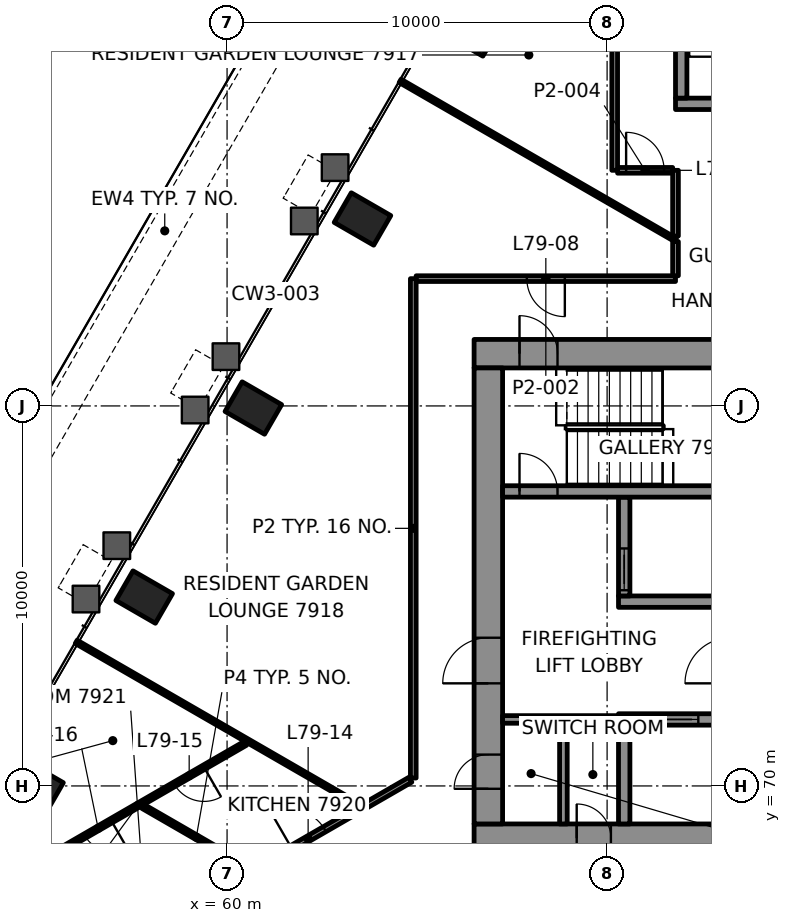
"""IFC4 building model, lengths in metres.
Left out: names, types, materials, properties, quantities, classifications, styles, units other than length and angle.
Written with IfcOpenShell. Run it as: python <this file> out.ifc"""

import sys

from ifc_helpers import new_model, si_unit, direction, frame, frame_2d, origin, origin_2d, place, context, subcontext, project, spatial, rectangle, hollow_rectangle, extrude, element, fill, save


model = new_model("IFC4")
c1 = context("Model", 3, precision=1e-05, world=origin(), true_north=direction((0.0, 1.0)))
c2 = subcontext(c1, "Body", "Model", "MODEL_VIEW")
j1 = project(units=[si_unit("LENGTHUNIT", "METRE"), si_unit("PLANEANGLEUNIT", "RADIAN")], contexts=[c1])
p1 = place(None, origin())
s1 = spatial("IfcSite", under=j1, at=p1, CompositionType="ELEMENT")
p2 = place(p1, origin())
s2 = spatial("IfcBuilding", under=s1, at=p2, CompositionType="ELEMENT")
p3 = place(p2, frame((0.0, 0.0, 323.1)))
s3 = spatial("IfcBuildingStorey", under=s2, at=p3, CompositionType="ELEMENT", Elevation=323.1)
for number, where, z_axis, x_axis in (
    (1, (66.435, 89.894, -0.0), (0.0, 0.0, 1.0), (-0.5, -0.866, 0.0)),
    (2, (63.563, 84.919, -0.0), (0.0, 0.0, 1.0), (-0.5, -0.866, 0.0)),
    (3, (60.691, 79.945, -0.0), (0.0, 0.0, 1.0), (-0.5, -0.866, 0.0)),
    (4, (57.819, 74.97, -0.0), (0.0, 0.0, 1.0), (-0.5, -0.866, 0.0)),
    (5, (54.948, 69.996, -0.0), (0.0, 0.0, 1.0), (-0.5, -0.866, 0.0)),
):
    element("IfcColumn", number, at=place(p3, frame(where, z_axis=z_axis, x_axis=x_axis)), inside=s3, PredefinedType="COLUMN", context=c2, shape_type="SweptSolid", body=[
        extrude(hollow_rectangle(XDim=0.9, YDim=1.2, WallThickness=0.06, at=origin_2d()), origin(), (0.0, 0.0, 1.0), 3.5),
    ])
p4 = place(p3, frame((66.5, 68.625, 0.0), z_axis=(0.0, 0.0, 1.0), x_axis=(1.0, 0.0, 0.0)))
e6 = element("IfcWall", 6, at=p4, inside=s3, PredefinedType="SHEAR", context=c2, shape_type="SweptSolid", body=[
    extrude(rectangle(XDim=17.0, YDim=0.75, at=frame_2d((8.5, 0.0))), origin(), (0.0, 0.0, 1.0), 3.2),
])
p5 = place(p4, frame((2.7, 0.0, 0.0)))
e7 = element("IfcOpeningElement", 7, at=p5, cuts=e6, PredefinedType="OPENING", context=c2, shape_type="SweptSolid", body=[
    extrude(rectangle(XDim=0.9, YDim=2.1, at=frame_2d((0.45, 1.05))), frame((0.0, 0.385, 0.0), z_axis=(0.0, -1.0, 0.0), x_axis=(1.0, 0.0, 0.0)), (0.0, 0.0, 1.0), 0.77),
])
p6 = place(p3, frame((66.5, 81.375, 0.0), z_axis=(0.0, 0.0, 1.0), x_axis=(1.0, 0.0, 0.0)))
e8 = element("IfcWall", 8, at=p6, inside=s3, PredefinedType="SHEAR", context=c2, shape_type="SweptSolid", body=[
    extrude(rectangle(XDim=17.0, YDim=0.75, at=frame_2d((8.5, 0.0))), origin(), (0.0, 0.0, 1.0), 3.2),
])
p7 = place(p6, frame((1.195, 0.0, 0.0)))
e9 = element("IfcOpeningElement", 9, at=p7, cuts=e8, PredefinedType="OPENING", context=c2, shape_type="SweptSolid", body=[
    extrude(rectangle(XDim=1.0, YDim=2.1, at=frame_2d((0.5, 1.05))), frame((0.0, 0.385, 0.0), z_axis=(0.0, -1.0, 0.0), x_axis=(1.0, 0.0, 0.0)), (0.0, 0.0, 1.0), 0.77),
])
p8 = place(p6, frame((15.005, 0.0, 0.0)))
e10 = element("IfcOpeningElement", 10, at=p8, cuts=e8, PredefinedType="OPENING", context=c2, shape_type="SweptSolid", body=[
    extrude(rectangle(XDim=1.0, YDim=2.1, at=frame_2d((0.5, 1.05))), frame((0.0, 0.385, 0.0), z_axis=(0.0, -1.0, 0.0), x_axis=(1.0, 0.0, 0.0)), (0.0, 0.0, 1.0), 0.77),
])
p9 = place(p6, frame((8.15, 0.0, 0.0)))
e11 = element("IfcOpeningElement", 11, at=p9, cuts=e8, PredefinedType="OPENING", context=c2, shape_type="SweptSolid", body=[
    extrude(rectangle(XDim=0.9, YDim=2.1, at=frame_2d((0.45, 1.05))), frame((0.0, 0.385, 0.0), z_axis=(0.0, -1.0, 0.0), x_axis=(1.0, 0.0, 0.0)), (0.0, 0.0, 1.0), 0.77),
])
p10 = place(p3, frame((66.875, 69.0, 0.0), z_axis=(0.0, 0.0, 1.0), x_axis=(0.0, 1.0, 0.0)))
e12 = element("IfcWall", 12, at=p10, inside=s3, PredefinedType="SHEAR", context=c2, shape_type="SweptSolid", body=[
    extrude(rectangle(XDim=12.0, YDim=0.75, at=frame_2d((6.0, 0.0))), origin(), (0.0, 0.0, 1.0), 3.2),
])
p11 = place(p10, frame((3.7, 0.0, 0.0)))
e13 = element("IfcOpeningElement", 13, at=p11, cuts=e12, PredefinedType="OPENING", context=c2, shape_type="SweptSolid", body=[
    extrude(rectangle(XDim=1.2, YDim=2.1, at=frame_2d((0.6, 1.05))), frame((0.0, 0.385, 0.0), z_axis=(0.0, -1.0, 0.0), x_axis=(1.0, 0.0, 0.0)), (0.0, 0.0, 1.0), 0.77),
])
p12 = place(p10, frame((0.925, 0.0, 0.0)))
e14 = element("IfcOpeningElement", 14, at=p12, cuts=e12, PredefinedType="OPENING", context=c2, shape_type="SweptSolid", body=[
    extrude(rectangle(XDim=0.9, YDim=2.1, at=frame_2d((0.45, 1.05))), frame((0.0, 0.385, 0.0), z_axis=(0.0, -1.0, 0.0), x_axis=(1.0, 0.0, 0.0)), (0.0, 0.0, 1.0), 0.77),
])
p13 = place(p3, frame((70.3, 71.75, 0.0), z_axis=(0.0, 0.0, 1.0), x_axis=(1.0, 0.0, 0.0)))
e15 = element("IfcWall", 15, at=p13, inside=s3, PredefinedType="SHEAR", context=c2, shape_type="SweptSolid", body=[
    extrude(rectangle(XDim=11.5, YDim=0.3, at=frame_2d((5.75, 0.0))), origin(), (0.0, 0.0, 1.0), 3.2),
])
p14 = place(p13, frame((1.0, 0.0, 0.0)))
e16 = element("IfcOpeningElement", 16, at=p14, cuts=e15, PredefinedType="OPENING", context=c2, shape_type="SweptSolid", body=[
    extrude(rectangle(XDim=1.1, YDim=2.1, at=frame_2d((0.55, 1.05))), frame((0.0, 0.16, 0.0), z_axis=(0.0, -1.0, 0.0), x_axis=(1.0, 0.0, 0.0)), (0.0, 0.0, 1.0), 0.32),
])
p15 = place(p13, frame((3.8, 0.0, 0.0)))
e17 = element("IfcOpeningElement", 17, at=p15, cuts=e15, PredefinedType="OPENING", context=c2, shape_type="SweptSolid", body=[
    extrude(rectangle(XDim=1.1, YDim=2.1, at=frame_2d((0.55, 1.05))), frame((0.0, 0.16, 0.0), z_axis=(0.0, -1.0, 0.0), x_axis=(1.0, 0.0, 0.0)), (0.0, 0.0, 1.0), 0.32),
])
p16 = place(p13, frame((6.6, 0.0, 0.0)))
e18 = element("IfcOpeningElement", 18, at=p16, cuts=e15, PredefinedType="OPENING", context=c2, shape_type="SweptSolid", body=[
    extrude(rectangle(XDim=1.1, YDim=2.1, at=frame_2d((0.55, 1.05))), frame((0.0, 0.16, 0.0), z_axis=(0.0, -1.0, 0.0), x_axis=(1.0, 0.0, 0.0)), (0.0, 0.0, 1.0), 0.32),
])
p17 = place(p13, frame((9.4, 0.0, 0.0)))
e19 = element("IfcOpeningElement", 19, at=p17, cuts=e15, PredefinedType="OPENING", context=c2, shape_type="SweptSolid", body=[
    extrude(rectangle(XDim=1.1, YDim=2.1, at=frame_2d((0.55, 1.05))), frame((0.0, 0.16, 0.0), z_axis=(0.0, -1.0, 0.0), x_axis=(1.0, 0.0, 0.0)), (0.0, 0.0, 1.0), 0.32),
])
p18 = place(p3, frame((70.3, 74.85, 0.0), z_axis=(0.0, 0.0, 1.0), x_axis=(1.0, 0.0, 0.0)))
e20 = element("IfcWall", 20, at=p18, inside=s3, PredefinedType="SHEAR", context=c2, shape_type="SweptSolid", body=[
    extrude(rectangle(XDim=5.9, YDim=0.3, at=frame_2d((2.95, 0.0))), origin(), (0.0, 0.0, 1.0), 3.2),
])
p19 = place(p18, frame((3.8, 0.0, 0.0)))
e21 = element("IfcOpeningElement", 21, at=p19, cuts=e20, PredefinedType="OPENING", context=c2, shape_type="SweptSolid", body=[
    extrude(rectangle(XDim=1.1, YDim=2.1, at=frame_2d((0.55, 1.05))), frame((0.0, 0.16, 0.0), z_axis=(0.0, -1.0, 0.0), x_axis=(1.0, 0.0, 0.0)), (0.0, 0.0, 1.0), 0.32),
])
p20 = place(p3, frame((70.45, 69.0, 0.0), z_axis=(0.0, 0.0, 1.0), x_axis=(0.0, 1.0, 0.0)))
e22 = element("IfcWall", 22, at=p20, inside=s3, PredefinedType="SHEAR", context=c2, shape_type="SweptSolid", body=[
    extrude(rectangle(XDim=2.6, YDim=0.3, at=frame_2d((1.3, 0.0))), origin(), (0.0, 0.0, 1.0), 3.2),
])
p21 = place(p3, frame((70.45, 75.0, 0.0), z_axis=(0.0, 0.0, 1.0), x_axis=(0.0, 1.0, 0.0)))
e23 = element("IfcWall", 23, at=p21, inside=s3, PredefinedType="SHEAR", context=c2, shape_type="SweptSolid", body=[
    extrude(rectangle(XDim=2.6, YDim=0.3, at=frame_2d((1.3, 0.0))), origin(), (0.0, 0.0, 1.0), 3.2),
])
p22 = place(p21, frame((0.15, 0.0, 0.0)))
e24 = element("IfcOpeningElement", 24, at=p22, cuts=e23, PredefinedType="OPENING", context=c2, shape_type="SweptSolid", body=[
    extrude(rectangle(XDim=1.1, YDim=2.1, at=frame_2d((0.55, 1.05))), frame((0.0, 0.16, 0.0), z_axis=(0.0, -1.0, 0.0), x_axis=(1.0, 0.0, 0.0)), (0.0, 0.0, 1.0), 0.32),
])
p23 = place(p3, frame((67.25, 77.75, 0.0), z_axis=(0.0, 0.0, 1.0), x_axis=(1.0, 0.0, 0.0)))
e25 = element("IfcWall", 25, at=p23, inside=s3, PredefinedType="SHEAR", context=c2, shape_type="SweptSolid", body=[
    extrude(rectangle(XDim=15.5, YDim=0.3, at=frame_2d((7.75, 0.0))), origin(), (0.0, 0.0, 1.0), 3.2),
])
p24 = place(p23, frame((0.445, 0.0, 0.0)))
e26 = element("IfcOpeningElement", 26, at=p24, cuts=e25, PredefinedType="OPENING", context=c2, shape_type="SweptSolid", body=[
    extrude(rectangle(XDim=1.0, YDim=2.1, at=frame_2d((0.5, 1.05))), frame((0.0, 0.16, 0.0), z_axis=(0.0, -1.0, 0.0), x_axis=(1.0, 0.0, 0.0)), (0.0, 0.0, 1.0), 0.32),
])
p25 = place(p3, frame((71.8, 87.95, 0.0), z_axis=(0.0, 0.0, 1.0), x_axis=(1.0, 0.0, 0.0)))
e27 = element("IfcWall", 27, at=p25, inside=s3, PredefinedType="SHEAR", context=c2, shape_type="SweptSolid", body=[
    extrude(rectangle(XDim=6.4, YDim=0.3, at=frame_2d((3.2, 0.0))), origin(), (0.0, 0.0, 1.0), 3.2),
])
p26 = place(p25, frame((1.325, 0.0, 0.0)))
e28 = element("IfcOpeningElement", 28, at=p26, cuts=e27, PredefinedType="OPENING", context=c2, shape_type="SweptSolid", body=[
    extrude(rectangle(XDim=1.0, YDim=2.1, at=frame_2d((0.5, 1.05))), frame((0.0, 0.16, 0.0), z_axis=(0.0, -1.0, 0.0), x_axis=(1.0, 0.0, 0.0)), (0.0, 0.0, 1.0), 0.32),
])
p27 = place(p25, frame((4.125, 0.0, 0.0)))
e29 = element("IfcOpeningElement", 29, at=p27, cuts=e27, PredefinedType="OPENING", context=c2, shape_type="SweptSolid", body=[
    extrude(rectangle(XDim=1.2, YDim=2.1, at=frame_2d((0.6, 1.05))), frame((0.0, 0.16, 0.0), z_axis=(0.0, -1.0, 0.0), x_axis=(1.0, 0.0, 0.0)), (0.0, 0.0, 1.0), 0.32),
])
p28 = place(p3, frame((71.95, 88.1, 0.0), z_axis=(0.0, 0.0, 1.0), x_axis=(0.0, 1.0, 0.0)))
e30 = element("IfcWall", 30, at=p28, inside=s3, PredefinedType="SHEAR", context=c2, shape_type="SweptSolid", body=[
    extrude(rectangle(XDim=6.2, YDim=0.3, at=frame_2d((3.1, 0.0))), origin(), (0.0, 0.0, 1.0), 3.2),
])
p29 = place(p3, frame((71.8, 83.35, 0.0), z_axis=(0.0, 0.0, 1.0), x_axis=(-1.0, 0.0, 0.0)))
e31 = element("IfcWall", 31, at=p29, inside=s3, PredefinedType="PARTITIONING", context=c2, shape_type="SweptSolid", body=[
    extrude(rectangle(XDim=6.824, YDim=0.15, at=frame_2d((3.412, 0.0))), origin(), (0.0, 0.0, 1.0), 2.6),
])
p30 = place(p29, frame((2.912, 0.0, 0.0)))
e32 = element("IfcOpeningElement", 32, at=p30, cuts=e31, PredefinedType="OPENING", context=c2, shape_type="SweptSolid", body=[
    extrude(rectangle(XDim=1.0, YDim=2.1, at=frame_2d((0.5, 1.05))), frame((0.0, 0.085, 0.0), z_axis=(0.0, -1.0, 0.0), x_axis=(1.0, 0.0, 0.0)), (0.0, 0.0, 1.0), 0.17),
])
p31 = place(p3, frame((70.276, 86.2, 0.0), z_axis=(0.0, 0.0, 1.0), x_axis=(1.0, 0.0, 0.0)))
e33 = element("IfcWall", 33, at=p31, inside=s3, PredefinedType="PARTITIONING", context=c2, shape_type="SweptSolid", body=[
    extrude(rectangle(XDim=1.449, YDim=0.15, at=frame_2d((0.725, 0.0))), origin(), (0.0, 0.0, 1.0), 2.6),
])
p32 = place(p31, frame((0.225, 0.0, 0.0)))
e34 = element("IfcOpeningElement", 34, at=p32, cuts=e33, PredefinedType="OPENING", context=c2, shape_type="SweptSolid", body=[
    extrude(rectangle(XDim=1.0, YDim=2.1, at=frame_2d((0.5, 1.05))), frame((0.0, 0.085, 0.0), z_axis=(0.0, -1.0, 0.0), x_axis=(1.0, 0.0, 0.0)), (0.0, 0.0, 1.0), 0.17),
])
p33 = place(p3, frame((55.244, 64.634, 0.0), z_axis=(0.0, 0.0, 1.0), x_axis=(0.866029028053, 0.499993722531, 0.0)))
e35 = element("IfcWall", 35, at=p33, inside=s3, PredefinedType="PARTITIONING", context=c2, shape_type="SweptSolid", body=[
    extrude(rectangle(XDim=11.063, YDim=0.15, at=frame_2d((5.531, 0.0))), origin(), (0.0, 0.0, 1.0), 2.6),
])
p34 = place(p33, frame((7.454, 0.0, 0.0)))
e36 = element("IfcOpeningElement", 36, at=p34, cuts=e35, PredefinedType="OPENING", context=c2, shape_type="SweptSolid", body=[
    extrude(rectangle(XDim=1.0, YDim=2.1, at=frame_2d((0.5, 1.05))), frame((0.0, 0.085, 0.0), z_axis=(0.0, -1.0, 0.0), x_axis=(1.0, 0.0, 0.0)), (0.0, 0.0, 1.0), 0.17),
])
p35 = place(p3, frame((60.485, 71.123, 0.0), z_axis=(0.0, 0.0, 1.0), x_axis=(-0.866018230694, -0.500012423951, 0.0)))
e37 = element("IfcWall", 37, at=p35, inside=s3, PredefinedType="PARTITIONING", context=c2, shape_type="SweptSolid", body=[
    extrude(rectangle(XDim=6.535, YDim=0.12, at=frame_2d((3.268, 0.0))), origin(), (0.0, 0.0, 1.0), 2.6),
])
p36 = place(p35, frame((1.261, 0.0, 0.0)))
e38 = element("IfcOpeningElement", 38, at=p36, cuts=e37, PredefinedType="OPENING", context=c2, shape_type="SweptSolid", body=[
    extrude(rectangle(XDim=0.9, YDim=2.1, at=frame_2d((0.45, 1.05))), frame((0.0, 0.07, 0.0), z_axis=(0.0, -1.0, 0.0), x_axis=(1.0, 0.0, 0.0)), (0.0, 0.0, 1.0), 0.14),
])
p37 = place(p35, frame((4.077, 0.0, 0.0)))
e39 = element("IfcOpeningElement", 39, at=p37, cuts=e37, PredefinedType="OPENING", context=c2, shape_type="SweptSolid", body=[
    extrude(rectangle(XDim=0.8, YDim=2.1, at=frame_2d((0.4, 1.05))), frame((0.0, 0.07, 0.0), z_axis=(0.0, -1.0, 0.0), x_axis=(1.0, 0.0, 0.0)), (0.0, 0.0, 1.0), 0.14),
])
p38 = place(p3, frame((71.8, 83.425, 0.0), z_axis=(0.0, 0.0, 1.0), x_axis=(0.0, 1.0, 0.0)))
e40 = element("IfcWall", 40, at=p38, inside=s3, PredefinedType="PARTITIONING", context=c2, shape_type="SweptSolid", body=[
    extrude(rectangle(XDim=0.901, YDim=0.15, at=frame_2d((0.451, 0.0))), origin(), (0.0, 0.0, 1.0), 2.6),
])
p39 = place(p3, frame((70.2, 86.2, 0.0), z_axis=(0.0, 0.0, 1.0), x_axis=(0.0, 1.0, 0.0)))
e41 = element("IfcWall", 41, at=p39, inside=s3, PredefinedType="PARTITIONING", context=c2, shape_type="SweptSolid", body=[
    extrude(rectangle(XDim=9.999, YDim=0.15, at=frame_2d((5.0, 0.0))), origin(), (0.0, 0.0, 1.0), 2.6),
])
p40 = place(p3, frame((64.9, 70.208, 0.0), z_axis=(0.0, 0.0, 1.0), x_axis=(0.0, 1.0, 0.0)))
e42 = element("IfcWall", 42, at=p40, inside=s3, PredefinedType="PARTITIONING", context=c2, shape_type="SweptSolid", body=[
    extrude(rectangle(XDim=13.141, YDim=0.15, at=frame_2d((6.571, 0.0))), origin(), (0.0, 0.0, 1.0), 2.6),
])
p41 = place(p3, frame((71.8, 84.369, 0.0), z_axis=(0.0, 0.0, 1.0), x_axis=(-0.866026229868, 0.499998569178, 0.0)))
e43 = element("IfcWall", 43, at=p41, inside=s3, PredefinedType="PARTITIONING", context=c2, shape_type="SweptSolid", body=[
    extrude(rectangle(XDim=8.368, YDim=0.1, at=frame_2d((4.184, 0.0))), origin(), (0.0, 0.0, 1.0), 2.588),
])
p42 = place(p3, frame((63.468, 69.498, 0.0), z_axis=(0.0, 0.0, 1.0), x_axis=(-0.866025107759, 0.500000512732, 0.0)))
e44 = element("IfcWall", 44, at=p42, inside=s3, PredefinedType="PARTITIONING", context=c2, shape_type="SweptSolid", body=[
    extrude(rectangle(XDim=8.588, YDim=0.1, at=frame_2d((4.294, 0.0))), origin(), (0.0, 0.0, 1.0), 2.6),
])
p43 = place(p3, frame((60.588, 67.845, 0.0), z_axis=(0.0, 0.0, 1.0), x_axis=(-0.86605210011, 0.499953757757, 0.0)))
e45 = element("IfcWall", 45, at=p43, inside=s3, PredefinedType="PARTITIONING", context=c2, shape_type="SweptSolid", body=[
    extrude(rectangle(XDim=3.228, YDim=0.12, at=frame_2d((1.614, 0.0))), origin(), (0.0, 0.0, 1.0), 2.6),
])
p44 = place(p3, frame((71.8, 84.47, 0.0), z_axis=(0.0, 0.0, 1.0), x_axis=(0.0, 1.0, 0.0)))
e46 = element("IfcWall", 46, at=p44, inside=s3, PredefinedType="PARTITIONING", context=c2, shape_type="SweptSolid", body=[
    extrude(rectangle(XDim=1.729, YDim=0.15, at=frame_2d((0.865, 0.0))), origin(), (0.0, 0.0, 1.0), 2.6),
])
p45 = place(p3, frame((69.117, 103.238, 0.0), z_axis=(0.0, 0.0, 1.0), x_axis=(-0.500001437611, -0.866024573778, 0.0)))
e47 = element("IfcWall", 47, at=p45, inside=s3, PredefinedType="SOLIDWALL", context=c2, shape_type="SweptSolid", body=[
    extrude(rectangle(XDim=43.027, YDim=0.8, at=frame_2d((21.513, 0.0))), origin(), (0.0, 0.0, 1.0), 0.9),
])
p46 = place(p3, frame((67.25, 71.75, 0.0), z_axis=(0.0, 0.0, 1.0), x_axis=(1.0, 0.0, 0.0)))
e48 = element("IfcWall", 48, at=p46, inside=s3, PredefinedType="PARTITIONING", context=c2, shape_type="SweptSolid", body=[
    extrude(rectangle(XDim=3.05, YDim=0.2, at=frame_2d((1.525, 0.0))), origin(), (0.0, 0.0, 1.0), 3.2),
])
p47 = place(p3, frame((68.85, 69.0, 0.0), z_axis=(0.0, 0.0, 1.0), x_axis=(0.0, 1.0, 0.0)))
e49 = element("IfcWall", 49, at=p47, inside=s3, PredefinedType="PARTITIONING", context=c2, shape_type="SweptSolid", body=[
    extrude(rectangle(XDim=2.65, YDim=0.2, at=frame_2d((1.325, 0.0))), origin(), (0.0, 0.0, 1.0), 3.2),
])
p48 = place(p30, origin())
e50 = element("IfcDoor", 50, at=p48, inside=s3, OperationType="SINGLE_SWING_RIGHT", PredefinedType="DOOR", context=c2, shape_type="SweptSolid", body=[
    extrude(rectangle(XDim=1.0, YDim=2.1, at=frame_2d((0.5, 1.05))), frame((0.0, 0.025, 0.0), z_axis=(0.0, -1.0, 0.0), x_axis=(1.0, 0.0, 0.0)), (0.0, 0.0, 1.0), 0.05),
])
fill(e32, e50)
p49 = place(p32, origin())
e51 = element("IfcDoor", 51, at=p49, inside=s3, OperationType="SINGLE_SWING_RIGHT", PredefinedType="DOOR", context=c2, shape_type="SweptSolid", body=[
    extrude(rectangle(XDim=1.0, YDim=2.1, at=frame_2d((0.5, 1.05))), frame((0.0, 0.025, 0.0), z_axis=(0.0, -1.0, 0.0), x_axis=(1.0, 0.0, 0.0)), (0.0, 0.0, 1.0), 0.05),
])
fill(e34, e51)
p50 = place(p34, origin())
e52 = element("IfcDoor", 52, at=p50, inside=s3, OperationType="SINGLE_SWING_LEFT", PredefinedType="DOOR", context=c2, shape_type="SweptSolid", body=[
    extrude(rectangle(XDim=1.0, YDim=2.1, at=frame_2d((0.5, 1.05))), frame((0.0, 0.025, 0.0), z_axis=(0.0, -1.0, 0.0), x_axis=(1.0, 0.0, 0.0)), (0.0, 0.0, 1.0), 0.05),
])
fill(e36, e52)
p51 = place(p36, origin())
e53 = element("IfcDoor", 53, at=p51, inside=s3, OperationType="SINGLE_SWING_LEFT", PredefinedType="DOOR", context=c2, shape_type="SweptSolid", body=[
    extrude(rectangle(XDim=0.9, YDim=2.1, at=frame_2d((0.45, 1.05))), frame((0.0, 0.025, 0.0), z_axis=(0.0, -1.0, 0.0), x_axis=(1.0, 0.0, 0.0)), (0.0, 0.0, 1.0), 0.05),
])
fill(e38, e53)
p52 = place(p37, origin())
e54 = element("IfcDoor", 54, at=p52, inside=s3, OperationType="SINGLE_SWING_LEFT", PredefinedType="DOOR", context=c2, shape_type="SweptSolid", body=[
    extrude(rectangle(XDim=0.8, YDim=2.1, at=frame_2d((0.4, 1.05))), frame((0.0, 0.025, 0.0), z_axis=(0.0, -1.0, 0.0), x_axis=(1.0, 0.0, 0.0)), (0.0, 0.0, 1.0), 0.05),
])
fill(e39, e54)
p53 = place(p14, origin())
e55 = element("IfcDoor", 55, at=p53, inside=s3, OperationType="DOUBLE_DOOR_SLIDING", PredefinedType="DOOR", context=c2, shape_type="SweptSolid", body=[
    extrude(rectangle(XDim=1.1, YDim=2.1, at=frame_2d((0.55, 1.05))), frame((0.0, 0.025, 0.0), z_axis=(0.0, -1.0, 0.0), x_axis=(1.0, 0.0, 0.0)), (0.0, 0.0, 1.0), 0.05),
])
fill(e16, e55)
p54 = place(p22, origin())
e56 = element("IfcDoor", 56, at=p54, inside=s3, OperationType="DOUBLE_DOOR_SLIDING", PredefinedType="DOOR", context=c2, shape_type="SweptSolid", body=[
    extrude(rectangle(XDim=1.1, YDim=2.1, at=frame_2d((0.55, 1.05))), frame((0.0, 0.025, 0.0), z_axis=(0.0, -1.0, 0.0), x_axis=(1.0, 0.0, 0.0)), (0.0, 0.0, 1.0), 0.05),
])
fill(e24, e56)
p55 = place(p24, origin())
e57 = element("IfcDoor", 57, at=p55, inside=s3, OperationType="SINGLE_SWING_LEFT", PredefinedType="DOOR", context=c2, shape_type="SweptSolid", body=[
    extrude(rectangle(XDim=1.0, YDim=2.1, at=frame_2d((0.5, 1.05))), frame((0.0, 0.025, 0.0), z_axis=(0.0, -1.0, 0.0), x_axis=(1.0, 0.0, 0.0)), (0.0, 0.0, 1.0), 0.05),
])
fill(e26, e57)
p56 = place(p7, origin())
e58 = element("IfcDoor", 58, at=p56, inside=s3, OperationType="SINGLE_SWING_RIGHT", PredefinedType="DOOR", context=c2, shape_type="SweptSolid", body=[
    extrude(rectangle(XDim=1.0, YDim=2.1, at=frame_2d((0.5, 1.05))), frame((0.0, 0.095, 0.0), z_axis=(0.0, -1.0, 0.0), x_axis=(1.0, 0.0, 0.0)), (0.0, 0.0, 1.0), 0.19),
])
fill(e9, e58)
p57 = place(p11, origin())
e59 = element("IfcDoor", 59, at=p57, inside=s3, OperationType="SINGLE_SWING_RIGHT", PredefinedType="DOOR", context=c2, shape_type="SweptSolid", body=[
    extrude(rectangle(XDim=1.2, YDim=2.1, at=frame_2d((0.6, 1.05))), frame((0.0, 0.095, 0.0), z_axis=(0.0, -1.0, 0.0), x_axis=(1.0, 0.0, 0.0)), (0.0, 0.0, 1.0), 0.19),
])
fill(e13, e59)
p58 = place(p12, origin())
e60 = element("IfcDoor", 60, at=p58, inside=s3, OperationType="SINGLE_SWING_RIGHT", PredefinedType="DOOR", context=c2, shape_type="SweptSolid", body=[
    extrude(rectangle(XDim=0.9, YDim=2.1, at=frame_2d((0.45, 1.05))), frame((0.0, 0.095, 0.0), z_axis=(0.0, -1.0, 0.0), x_axis=(1.0, 0.0, 0.0)), (0.0, 0.0, 1.0), 0.19),
])
fill(e14, e60)
p59 = place(p5, origin())
e61 = element("IfcDoor", 61, at=p59, inside=s3, OperationType="SINGLE_SWING_LEFT", PredefinedType="DOOR", context=c2, shape_type="SweptSolid", body=[
    extrude(rectangle(XDim=0.9, YDim=2.1, at=frame_2d((0.45, 1.05))), frame((0.0, 0.095, 0.0), z_axis=(0.0, -1.0, 0.0), x_axis=(1.0, 0.0, 0.0)), (0.0, 0.0, 1.0), 0.19),
])
fill(e7, e61)
save(model, sys.argv[1])
